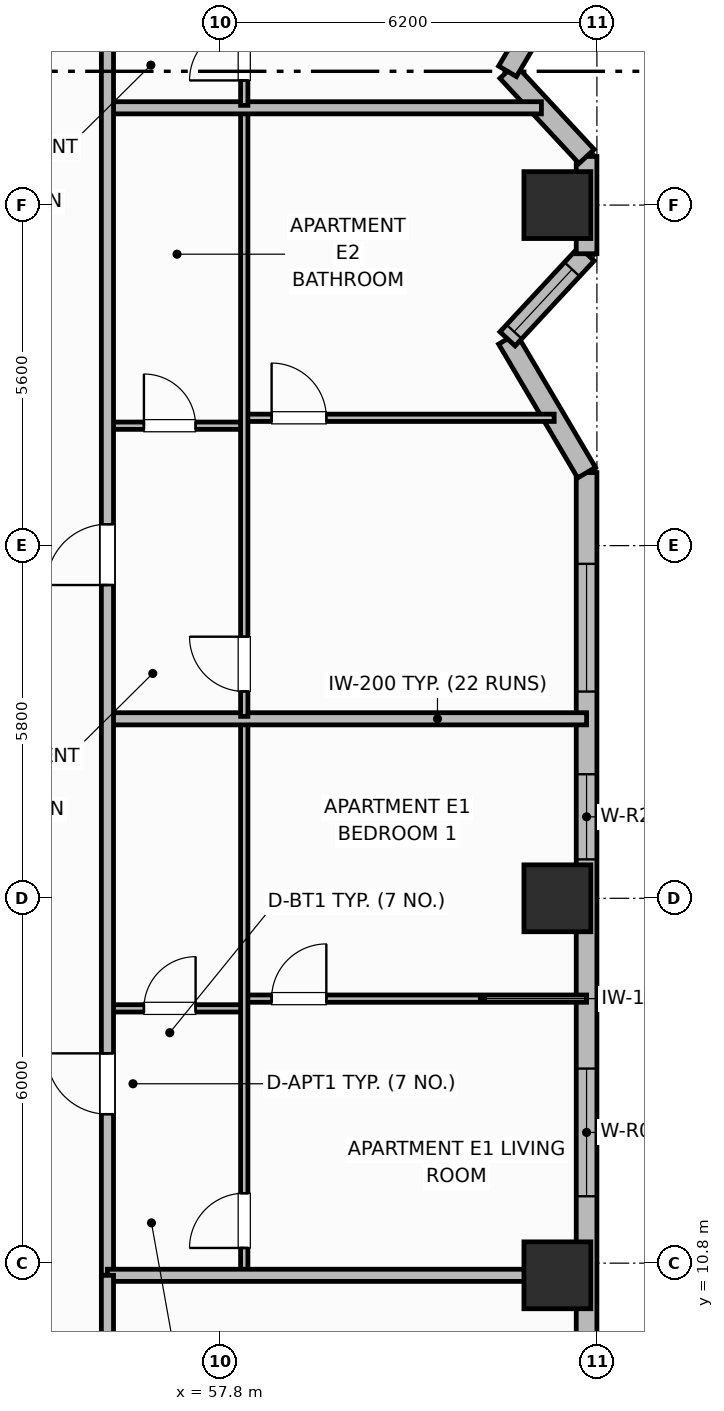
"""IFC4 building model, lengths in metres.
Left out: names, types, materials, properties, quantities, classifications, styles, units other than length and angle.
Written with IfcOpenShell. Run it as: python <this file> out.ifc"""

import sys

from ifc_helpers import new_model, si_unit, direction, frame, frame_2d, origin, origin_2d, place, context, subcontext, project, spatial, rectangle, extrude, element, fill, save


model = new_model("IFC4")
c1 = context("Model", 3, precision=1e-05, world=origin(), true_north=direction((0.0, 1.0)))
c2 = subcontext(c1, "Body", "Model", "MODEL_VIEW")
j1 = project(units=[si_unit("LENGTHUNIT", "METRE"), si_unit("PLANEANGLEUNIT", "RADIAN")], contexts=[c1])
p1 = place(None, origin())
s1 = spatial("IfcSite", under=j1, at=p1, CompositionType="ELEMENT")
p2 = place(p1, origin())
s2 = spatial("IfcBuilding", under=s1, at=p2, CompositionType="ELEMENT")
p3 = place(p2, frame((0.0, 0.0, 114.2)))
s3 = spatial("IfcBuildingStorey", under=s2, at=p3, CompositionType="ELEMENT", Elevation=114.2)
for number, where, z_axis, x_axis in (
    (1, (63.35, 10.6, 0.0), (0.0, 0.0, 1.0), (1.0, 0.0, 0.0)),
    (2, (63.35, 16.8, 0.0), (0.0, 0.0, 1.0), (1.0, 0.0, 0.0)),
    (3, (63.35, 28.2, 0.0), (0.0, 0.0, 1.0), (1.0, 0.0, 0.0)),
):
    element("IfcColumn", number, at=place(p3, frame(where, z_axis=z_axis, x_axis=x_axis)), inside=s3, PredefinedType="COLUMN", context=c2, shape_type="SweptSolid", body=[
        extrude(rectangle(XDim=1.1, YDim=1.1, at=origin_2d()), origin(), (0.0, 0.0, 1.0), 3.7),
    ])
p4 = place(p3, frame((63.83, 9.0, 0.0), z_axis=(0.0, 0.0, 1.0), x_axis=(0.0, 1.0, 0.0)))
e4 = element("IfcWall", 4, at=p4, inside=s3, PredefinedType="SOLIDWALL", context=c2, shape_type="SweptSolid", body=[
    extrude(rectangle(XDim=14.8, YDim=0.34, at=frame_2d((7.4, 0.0))), origin(), (0.0, 0.0, 1.0), 2.7),
])
p5 = place(p4, frame((2.9, 0.0, 0.68)))
e5 = element("IfcOpeningElement", 5, at=p5, cuts=e4, PredefinedType="OPENING", context=c2, shape_type="SweptSolid", body=[
    extrude(rectangle(XDim=2.1, YDim=1.9, at=frame_2d((1.05, 0.95))), frame((0.0, 0.18, 0.0), z_axis=(0.0, -1.0, 0.0), x_axis=(1.0, 0.0, 0.0)), (0.0, 0.0, 1.0), 0.36),
])
p6 = place(p4, frame((8.44, 0.0, 0.69)))
e6 = element("IfcOpeningElement", 6, at=p6, cuts=e4, PredefinedType="OPENING", context=c2, shape_type="SweptSolid", body=[
    extrude(rectangle(XDim=1.4, YDim=1.85, at=frame_2d((0.7, 0.925))), frame((0.0, 0.18, 0.0), z_axis=(0.0, -1.0, 0.0), x_axis=(1.0, 0.0, 0.0)), (0.0, 0.0, 1.0), 0.36),
])
p7 = place(p4, frame((11.2, 0.0, 0.68)))
e7 = element("IfcOpeningElement", 7, at=p7, cuts=e4, PredefinedType="OPENING", context=c2, shape_type="SweptSolid", body=[
    extrude(rectangle(XDim=2.1, YDim=1.9, at=frame_2d((1.05, 0.95))), frame((0.0, 0.18, 0.0), z_axis=(0.0, -1.0, 0.0), x_axis=(1.0, 0.0, 0.0)), (0.0, 0.0, 1.0), 0.36),
])
p8 = place(p3, frame((63.83, 23.8, 0.0), z_axis=(0.0, 0.0, 1.0), x_axis=(-0.508751843651, 0.860913213734, 0.0)))
e8 = element("IfcWall", 8, at=p8, inside=s3, PredefinedType="SOLIDWALL", context=c2, shape_type="SweptSolid", body=[
    extrude(rectangle(XDim=2.555, YDim=0.34, at=frame_2d((1.278, 0.0))), origin(), (0.0, 0.0, 1.0), 2.7),
])
p9 = place(p3, frame((62.53, 26.0, 0.0), z_axis=(0.0, 0.0, 1.0), x_axis=(0.68049031116, 0.732757078722, 0.0)))
e9 = element("IfcWall", 9, at=p9, inside=s3, PredefinedType="SOLIDWALL", context=c2, shape_type="SweptSolid", body=[
    extrude(rectangle(XDim=1.91, YDim=0.34, at=frame_2d((0.955, 0.0))), origin(), (0.0, 0.0, 1.0), 2.7),
])
p10 = place(p9, frame((0.16, 0.0, 0.69)))
e10 = element("IfcOpeningElement", 10, at=p10, cuts=e9, PredefinedType="OPENING", context=c2, shape_type="SweptSolid", body=[
    extrude(rectangle(XDim=1.4, YDim=1.85, at=frame_2d((0.7, 0.925))), frame((0.0, 0.18, 0.0), z_axis=(0.0, -1.0, 0.0), x_axis=(1.0, 0.0, 0.0)), (0.0, 0.0, 1.0), 0.36),
])
p11 = place(p3, frame((63.83, 27.4, 0.0), z_axis=(0.0, 0.0, 1.0), x_axis=(0.0, 1.0, 0.0)))
e11 = element("IfcWall", 11, at=p11, inside=s3, PredefinedType="SOLIDWALL", context=c2, shape_type="SweptSolid", body=[
    extrude(rectangle(XDim=1.6, YDim=0.34, at=frame_2d((0.8, 0.0))), origin(), (0.0, 0.0, 1.0), 2.7),
])
p12 = place(p3, frame((63.83, 29.0, 0.0), z_axis=(0.0, 0.0, 1.0), x_axis=(-0.68049031116, 0.732757078722, 0.0)))
e12 = element("IfcWall", 12, at=p12, inside=s3, PredefinedType="SOLIDWALL", context=c2, shape_type="SweptSolid", body=[
    extrude(rectangle(XDim=1.91, YDim=0.34, at=frame_2d((0.955, 0.0))), origin(), (0.0, 0.0, 1.0), 2.7),
])
p13 = place(p3, frame((62.53, 30.4, 0.0), z_axis=(0.0, 0.0, 1.0), x_axis=(0.508710000703, 0.860937939218, 0.0)))
e13 = element("IfcWall", 13, at=p13, inside=s3, PredefinedType="SOLIDWALL", context=c2, shape_type="SweptSolid", body=[
    extrude(rectangle(XDim=2.556, YDim=0.34, at=frame_2d((1.278, 0.0))), origin(), (0.0, 0.0, 1.0), 2.7),
])
p14 = place(p13, frame((0.728, 0.0, 0.89)))
e14 = element("IfcOpeningElement", 14, at=p14, cuts=e13, PredefinedType="OPENING", context=c2, shape_type="SweptSolid", body=[
    extrude(rectangle(XDim=1.1, YDim=1.65, at=frame_2d((0.55, 0.825))), frame((0.0, 0.18, 0.0), z_axis=(0.0, -1.0, 0.0), x_axis=(1.0, 0.0, 0.0)), (0.0, 0.0, 1.0), 0.36),
])
p15 = place(p3, frame((55.95, 14.99, 0.0), z_axis=(0.0, 0.0, 1.0), x_axis=(1.0, 0.0, 0.0)))
e15 = element("IfcWall", 15, at=p15, inside=s3, PredefinedType="PARTITIONING", context=c2, shape_type="SweptSolid", body=[
    extrude(rectangle(XDim=2.25, YDim=0.12, at=frame_2d((1.125, 0.0))), origin(), (0.0, 0.0, 1.0), 2.53),
])
p16 = place(p15, frame((0.6, 0.0, 0.0)))
e16 = element("IfcOpeningElement", 16, at=p16, cuts=e15, PredefinedType="OPENING", context=c2, shape_type="SweptSolid", body=[
    extrude(rectangle(XDim=0.85, YDim=2.1, at=frame_2d((0.425, 1.05))), frame((0.0, 0.07, 0.0), z_axis=(0.0, -1.0, 0.0), x_axis=(1.0, 0.0, 0.0)), (0.0, 0.0, 1.0), 0.14),
])
p17 = place(p3, frame((58.2, 15.15, 0.0), z_axis=(0.0, 0.0, 1.0), x_axis=(1.0, 0.0, 0.0)))
e17 = element("IfcWall", 17, at=p17, inside=s3, PredefinedType="PARTITIONING", context=c2, shape_type="SweptSolid", body=[
    extrude(rectangle(XDim=5.63, YDim=0.12, at=frame_2d((2.815, 0.0))), origin(), (0.0, 0.0, 1.0), 2.53),
])
p18 = place(p17, frame((0.45, 0.0, 0.0)))
e18 = element("IfcOpeningElement", 18, at=p18, cuts=e17, PredefinedType="OPENING", context=c2, shape_type="SweptSolid", body=[
    extrude(rectangle(XDim=0.9, YDim=2.1, at=frame_2d((0.45, 1.05))), frame((0.0, 0.07, 0.0), z_axis=(0.0, -1.0, 0.0), x_axis=(1.0, 0.0, 0.0)), (0.0, 0.0, 1.0), 0.14),
])
p19 = place(p3, frame((58.2, 10.64, 0.0), z_axis=(0.0, 0.0, 1.0), x_axis=(0.0, 1.0, 0.0)))
e19 = element("IfcWall", 19, at=p19, inside=s3, PredefinedType="PARTITIONING", context=c2, shape_type="SweptSolid", body=[
    extrude(rectangle(XDim=9.072, YDim=0.12, at=frame_2d((4.536, 0.0))), origin(), (0.0, 0.0, 1.0), 2.53),
])
p20 = place(p19, frame((0.41, 0.0, 0.0)))
e20 = element("IfcOpeningElement", 20, at=p20, cuts=e19, PredefinedType="OPENING", context=c2, shape_type="SweptSolid", body=[
    extrude(rectangle(XDim=0.9, YDim=2.1, at=frame_2d((0.45, 1.05))), frame((0.0, 0.07, 0.0), z_axis=(0.0, -1.0, 0.0), x_axis=(1.0, 0.0, 0.0)), (0.0, 0.0, 1.0), 0.14),
])
p21 = place(p3, frame((55.95, 19.752, 0.0), z_axis=(0.0, 0.0, 1.0), x_axis=(1.0, 0.0, 0.0)))
e21 = element("IfcWall", 21, at=p21, inside=s3, PredefinedType="PARTITIONING", context=c2, shape_type="SweptSolid", body=[
    extrude(rectangle(XDim=7.88, YDim=0.2, at=frame_2d((3.94, 0.0))), origin(), (0.0, 0.0, 1.0), 2.53),
])
p22 = place(p3, frame((55.95, 24.572, 0.0), z_axis=(0.0, 0.0, 1.0), x_axis=(1.0, 0.0, 0.0)))
e22 = element("IfcWall", 22, at=p22, inside=s3, PredefinedType="PARTITIONING", context=c2, shape_type="SweptSolid", body=[
    extrude(rectangle(XDim=2.25, YDim=0.12, at=frame_2d((1.125, 0.0))), origin(), (0.0, 0.0, 1.0), 2.53),
])
p23 = place(p22, frame((0.6, 0.0, 0.0)))
e23 = element("IfcOpeningElement", 23, at=p23, cuts=e22, PredefinedType="OPENING", context=c2, shape_type="SweptSolid", body=[
    extrude(rectangle(XDim=0.85, YDim=2.1, at=frame_2d((0.425, 1.05))), frame((0.0, 0.07, 0.0), z_axis=(0.0, -1.0, 0.0), x_axis=(1.0, 0.0, 0.0)), (0.0, 0.0, 1.0), 0.14),
])
p24 = place(p3, frame((58.2, 24.702, 0.0), z_axis=(0.0, 0.0, 1.0), x_axis=(1.0, 0.0, 0.0)))
e24 = element("IfcWall", 24, at=p24, inside=s3, PredefinedType="PARTITIONING", context=c2, shape_type="SweptSolid", body=[
    extrude(rectangle(XDim=5.097, YDim=0.12, at=frame_2d((2.549, 0.0))), origin(), (0.0, 0.0, 1.0), 2.53),
])
p25 = place(p24, frame((0.45, 0.0, 0.0)))
e25 = element("IfcOpeningElement", 25, at=p25, cuts=e24, PredefinedType="OPENING", context=c2, shape_type="SweptSolid", body=[
    extrude(rectangle(XDim=0.9, YDim=2.1, at=frame_2d((0.45, 1.05))), frame((0.0, 0.07, 0.0), z_axis=(0.0, -1.0, 0.0), x_axis=(1.0, 0.0, 0.0)), (0.0, 0.0, 1.0), 0.14),
])
p26 = place(p3, frame((58.2, 19.792, 0.0), z_axis=(0.0, 0.0, 1.0), x_axis=(0.0, 1.0, 0.0)))
e26 = element("IfcWall", 26, at=p26, inside=s3, PredefinedType="PARTITIONING", context=c2, shape_type="SweptSolid", body=[
    extrude(rectangle(XDim=9.968, YDim=0.12, at=frame_2d((4.984, 0.0))), origin(), (0.0, 0.0, 1.0), 2.53),
])
p27 = place(p26, frame((0.41, 0.0, 0.0)))
e27 = element("IfcOpeningElement", 27, at=p27, cuts=e26, PredefinedType="OPENING", context=c2, shape_type="SweptSolid", body=[
    extrude(rectangle(XDim=0.9, YDim=2.1, at=frame_2d((0.45, 1.05))), frame((0.0, 0.07, 0.0), z_axis=(0.0, -1.0, 0.0), x_axis=(1.0, 0.0, 0.0)), (0.0, 0.0, 1.0), 0.14),
])
p28 = place(p3, frame((55.95, 29.8, 0.0), z_axis=(0.0, 0.0, 1.0), x_axis=(1.0, 0.0, 0.0)))
e28 = element("IfcWall", 28, at=p28, inside=s3, PredefinedType="PARTITIONING", context=c2, shape_type="SweptSolid", body=[
    extrude(rectangle(XDim=7.137, YDim=0.2, at=frame_2d((3.569, 0.0))), origin(), (0.0, 0.0, 1.0), 2.53),
])
p29 = place(p3, frame((58.2, 29.84, 0.0), z_axis=(0.0, 0.0, 1.0), x_axis=(0.0, 1.0, 0.0)))
e29 = element("IfcWall", 29, at=p29, inside=s3, PredefinedType="PARTITIONING", context=c2, shape_type="SweptSolid", body=[
    extrude(rectangle(XDim=7.472, YDim=0.12, at=frame_2d((3.736, 0.0))), origin(), (0.0, 0.0, 1.0), 2.53),
])
p30 = place(p29, frame((0.41, 0.0, 0.0)))
e30 = element("IfcOpeningElement", 30, at=p30, cuts=e29, PredefinedType="OPENING", context=c2, shape_type="SweptSolid", body=[
    extrude(rectangle(XDim=0.9, YDim=2.1, at=frame_2d((0.45, 1.05))), frame((0.0, 0.07, 0.0), z_axis=(0.0, -1.0, 0.0), x_axis=(1.0, 0.0, 0.0)), (0.0, 0.0, 1.0), 0.14),
])
p31 = place(p3, frame((55.95, 10.6, 0.0), z_axis=(0.0, 0.0, 1.0), x_axis=(0.0, 1.0, 0.0)))
e31 = element("IfcWall", 31, at=p31, inside=s3, PredefinedType="PARTITIONING", context=c2, shape_type="SweptSolid", body=[
    extrude(rectangle(XDim=35.2, YDim=0.2, at=frame_2d((17.6, 0.0))), origin(), (0.0, 0.0, 1.0), 2.53),
])
p32 = place(p31, frame((2.65, 0.0, 0.0)))
e32 = element("IfcOpeningElement", 32, at=p32, cuts=e31, PredefinedType="OPENING", context=c2, shape_type="SweptSolid", body=[
    extrude(rectangle(XDim=1.0, YDim=2.15, at=frame_2d((0.5, 1.075))), frame((0.0, 0.11, 0.0), z_axis=(0.0, -1.0, 0.0), x_axis=(1.0, 0.0, 0.0)), (0.0, 0.0, 1.0), 0.22),
])
p33 = place(p31, frame((11.352, 0.0, 0.0)))
e33 = element("IfcOpeningElement", 33, at=p33, cuts=e31, PredefinedType="OPENING", context=c2, shape_type="SweptSolid", body=[
    extrude(rectangle(XDim=1.0, YDim=2.15, at=frame_2d((0.5, 1.075))), frame((0.0, 0.11, 0.0), z_axis=(0.0, -1.0, 0.0), x_axis=(1.0, 0.0, 0.0)), (0.0, 0.0, 1.0), 0.22),
])
p34 = place(p31, frame((21.37, 0.0, 0.0)))
e34 = element("IfcOpeningElement", 34, at=p34, cuts=e31, PredefinedType="OPENING", context=c2, shape_type="SweptSolid", body=[
    extrude(rectangle(XDim=1.0, YDim=2.15, at=frame_2d((0.5, 1.075))), frame((0.0, 0.11, 0.0), z_axis=(0.0, -1.0, 0.0), x_axis=(1.0, 0.0, 0.0)), (0.0, 0.0, 1.0), 0.22),
])
p35 = place(p31, frame((27.302, 0.0, 0.0)))
e35 = element("IfcOpeningElement", 35, at=p35, cuts=e31, PredefinedType="OPENING", context=c2, shape_type="SweptSolid", body=[
    extrude(rectangle(XDim=1.0, YDim=2.15, at=frame_2d((0.5, 1.075))), frame((0.0, 0.11, 0.0), z_axis=(0.0, -1.0, 0.0), x_axis=(1.0, 0.0, 0.0)), (0.0, 0.0, 1.0), 0.22),
])
p36 = place(p3, frame((55.95, 10.6, 0.0), z_axis=(0.0, 0.0, 1.0), x_axis=(1.0, 0.0, 0.0)))
e36 = element("IfcWall", 36, at=p36, inside=s3, PredefinedType="PARTITIONING", context=c2, shape_type="SweptSolid", body=[
    extrude(rectangle(XDim=7.46, YDim=0.2, at=frame_2d((3.73, 0.0))), origin(), (0.0, 0.0, 1.0), 2.53),
])
p37 = place(p3, frame((55.95, 4.97, 0.0), z_axis=(0.0, 0.0, 1.0), x_axis=(0.0, 1.0, 0.0)))
e37 = element("IfcWall", 37, at=p37, inside=s3, PredefinedType="PARTITIONING", context=c2, shape_type="SweptSolid", body=[
    extrude(rectangle(XDim=5.63, YDim=0.2, at=frame_2d((2.815, 0.0))), origin(), (0.0, 0.0, 1.0), 2.53),
])
p38 = place(p5, origin())
e38 = element("IfcWindow", 38, at=p38, inside=s3, PartitioningType="SINGLE_PANEL", PredefinedType="WINDOW", context=c2, shape_type="SweptSolid", body=[
    extrude(rectangle(XDim=2.1, YDim=1.9, at=frame_2d((1.05, 0.95))), frame((0.0, 0.03, 0.0), z_axis=(0.0, -1.0, 0.0), x_axis=(1.0, 0.0, 0.0)), (0.0, 0.0, 1.0), 0.06),
])
fill(e5, e38)
p39 = place(p6, origin())
e39 = element("IfcWindow", 39, at=p39, inside=s3, PartitioningType="SINGLE_PANEL", PredefinedType="WINDOW", context=c2, shape_type="SweptSolid", body=[
    extrude(rectangle(XDim=1.4, YDim=1.85, at=frame_2d((0.7, 0.925))), frame((0.0, 0.03, 0.0), z_axis=(0.0, -1.0, 0.0), x_axis=(1.0, 0.0, 0.0)), (0.0, 0.0, 1.0), 0.06),
])
fill(e6, e39)
p40 = place(p7, origin())
e40 = element("IfcWindow", 40, at=p40, inside=s3, PartitioningType="SINGLE_PANEL", PredefinedType="WINDOW", context=c2, shape_type="SweptSolid", body=[
    extrude(rectangle(XDim=2.1, YDim=1.9, at=frame_2d((1.05, 0.95))), frame((0.0, 0.03, 0.0), z_axis=(0.0, -1.0, 0.0), x_axis=(1.0, 0.0, 0.0)), (0.0, 0.0, 1.0), 0.06),
])
fill(e7, e40)
p41 = place(p10, origin())
e41 = element("IfcWindow", 41, at=p41, inside=s3, PartitioningType="SINGLE_PANEL", PredefinedType="WINDOW", context=c2, shape_type="SweptSolid", body=[
    extrude(rectangle(XDim=1.4, YDim=1.85, at=frame_2d((0.7, 0.925))), frame((0.0, 0.03, 0.0), z_axis=(0.0, -1.0, 0.0), x_axis=(1.0, 0.0, 0.0)), (0.0, 0.0, 1.0), 0.06),
])
fill(e10, e41)
p42 = place(p16, origin())
e42 = element("IfcDoor", 42, at=p42, inside=s3, OperationType="SINGLE_SWING_RIGHT", PredefinedType="DOOR", context=c2, shape_type="SweptSolid", body=[
    extrude(rectangle(XDim=0.85, YDim=2.1, at=frame_2d((0.425, 1.05))), frame((0.0, 0.025, 0.0), z_axis=(0.0, -1.0, 0.0), x_axis=(1.0, 0.0, 0.0)), (0.0, 0.0, 1.0), 0.05),
])
fill(e16, e42)
p43 = place(p18, origin())
e43 = element("IfcDoor", 43, at=p43, inside=s3, OperationType="SINGLE_SWING_RIGHT", PredefinedType="DOOR", context=c2, shape_type="SweptSolid", body=[
    extrude(rectangle(XDim=0.9, YDim=2.1, at=frame_2d((0.45, 1.05))), frame((0.0, 0.025, 0.0), z_axis=(0.0, -1.0, 0.0), x_axis=(1.0, 0.0, 0.0)), (0.0, 0.0, 1.0), 0.05),
])
fill(e18, e43)
p44 = place(p20, origin())
e44 = element("IfcDoor", 44, at=p44, inside=s3, OperationType="SINGLE_SWING_LEFT", PredefinedType="DOOR", context=c2, shape_type="SweptSolid", body=[
    extrude(rectangle(XDim=0.9, YDim=2.1, at=frame_2d((0.45, 1.05))), frame((0.0, 0.025, 0.0), z_axis=(0.0, -1.0, 0.0), x_axis=(1.0, 0.0, 0.0)), (0.0, 0.0, 1.0), 0.05),
])
fill(e20, e44)
p45 = place(p23, origin())
e45 = element("IfcDoor", 45, at=p45, inside=s3, OperationType="SINGLE_SWING_LEFT", PredefinedType="DOOR", context=c2, shape_type="SweptSolid", body=[
    extrude(rectangle(XDim=0.85, YDim=2.1, at=frame_2d((0.425, 1.05))), frame((0.0, 0.025, 0.0), z_axis=(0.0, -1.0, 0.0), x_axis=(1.0, 0.0, 0.0)), (0.0, 0.0, 1.0), 0.05),
])
fill(e23, e45)
p46 = place(p25, origin())
e46 = element("IfcDoor", 46, at=p46, inside=s3, OperationType="SINGLE_SWING_LEFT", PredefinedType="DOOR", context=c2, shape_type="SweptSolid", body=[
    extrude(rectangle(XDim=0.9, YDim=2.1, at=frame_2d((0.45, 1.05))), frame((0.0, 0.025, 0.0), z_axis=(0.0, -1.0, 0.0), x_axis=(1.0, 0.0, 0.0)), (0.0, 0.0, 1.0), 0.05),
])
fill(e25, e46)
p47 = place(p27, origin())
e47 = element("IfcDoor", 47, at=p47, inside=s3, OperationType="SINGLE_SWING_RIGHT", PredefinedType="DOOR", context=c2, shape_type="SweptSolid", body=[
    extrude(rectangle(XDim=0.9, YDim=2.1, at=frame_2d((0.45, 1.05))), frame((0.0, 0.025, 0.0), z_axis=(0.0, -1.0, 0.0), x_axis=(1.0, 0.0, 0.0)), (0.0, 0.0, 1.0), 0.05),
])
fill(e27, e47)
p48 = place(p30, origin())
e48 = element("IfcDoor", 48, at=p48, inside=s3, OperationType="SINGLE_SWING_LEFT", PredefinedType="DOOR", context=c2, shape_type="SweptSolid", body=[
    extrude(rectangle(XDim=0.9, YDim=2.1, at=frame_2d((0.45, 1.05))), frame((0.0, 0.025, 0.0), z_axis=(0.0, -1.0, 0.0), x_axis=(1.0, 0.0, 0.0)), (0.0, 0.0, 1.0), 0.05),
])
fill(e30, e48)
p49 = place(p32, origin())
e49 = element("IfcDoor", 49, at=p49, inside=s3, OperationType="SINGLE_SWING_RIGHT", PredefinedType="DOOR", context=c2, shape_type="SweptSolid", body=[
    extrude(rectangle(XDim=1.0, YDim=2.15, at=frame_2d((0.5, 1.075))), frame((0.0, 0.025, 0.0), z_axis=(0.0, -1.0, 0.0), x_axis=(1.0, 0.0, 0.0)), (0.0, 0.0, 1.0), 0.05),
])
fill(e32, e49)
p50 = place(p33, origin())
e50 = element("IfcDoor", 50, at=p50, inside=s3, OperationType="SINGLE_SWING_LEFT", PredefinedType="DOOR", context=c2, shape_type="SweptSolid", body=[
    extrude(rectangle(XDim=1.0, YDim=2.15, at=frame_2d((0.5, 1.075))), frame((0.0, 0.025, 0.0), z_axis=(0.0, -1.0, 0.0), x_axis=(1.0, 0.0, 0.0)), (0.0, 0.0, 1.0), 0.05),
])
fill(e33, e50)
save(model, sys.argv[1])
